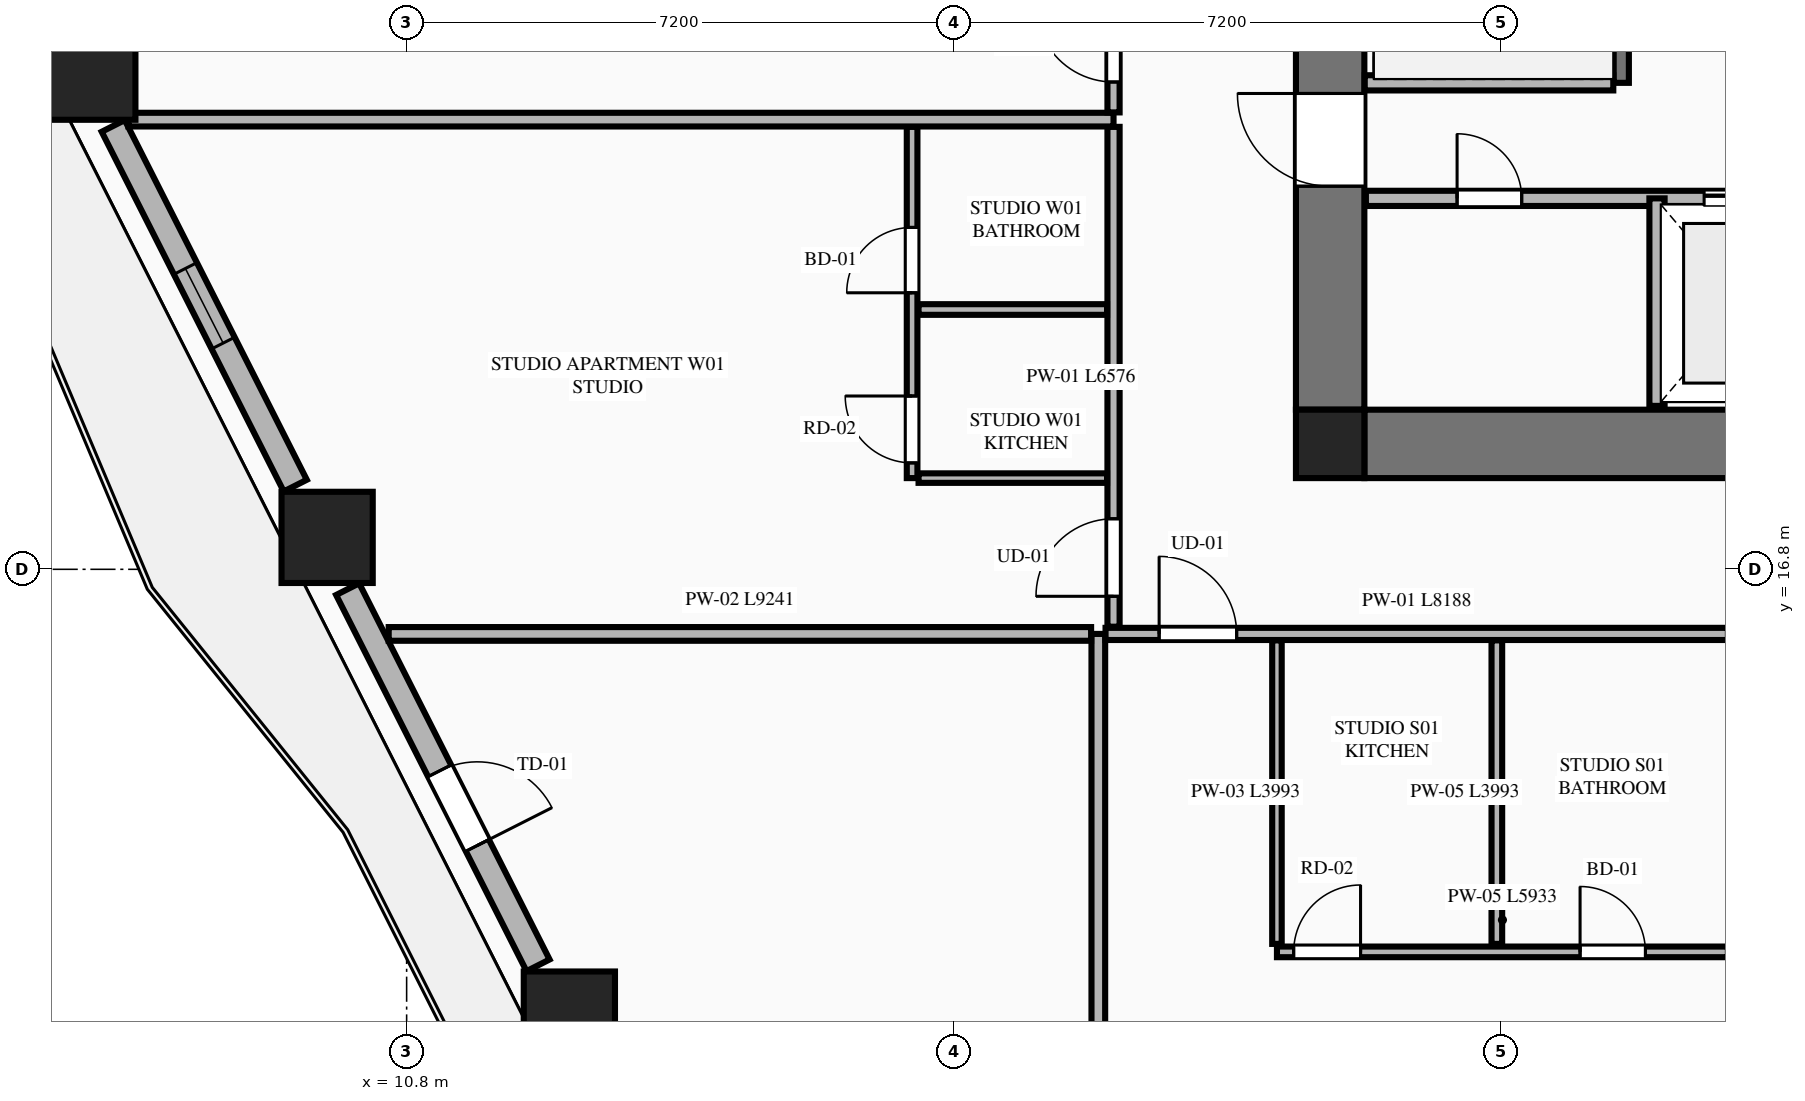
"""IFC4 building model, lengths in metres.
Left out: names, types, materials, properties, quantities, classifications, styles, units other than length and angle.
Written with IfcOpenShell. Run it as: python <this file> out.ifc"""

import sys

from ifc_helpers import new_model, si_unit, direction, frame, frame_2d, origin, origin_2d, place, context, subcontext, project, spatial, rectangle, extrude, element, fill, save


model = new_model("IFC4")
c1 = context("Model", 3, precision=1e-05, world=origin(), true_north=direction((0.0, 1.0)))
c2 = subcontext(c1, "Body", "Model", "MODEL_VIEW")
j1 = project(units=[si_unit("LENGTHUNIT", "METRE"), si_unit("PLANEANGLEUNIT", "RADIAN")], contexts=[c1])
p1 = place(None, origin())
s1 = spatial("IfcSite", under=j1, at=p1, CompositionType="ELEMENT")
p2 = place(p1, origin())
s2 = spatial("IfcBuilding", under=s1, at=p2, CompositionType="ELEMENT")
p3 = place(p2, frame((0.0, 0.0, 39.1)))
s3 = spatial("IfcBuildingStorey", under=s2, at=p3, CompositionType="ELEMENT", Elevation=39.1)
p4 = place(p3, frame((22.95, 18.45, 0.0), z_axis=(0.0, 0.0, 1.0), x_axis=(1.0, 0.0, 0.0)))
e1 = element("IfcColumn", 1, at=p4, inside=s3, PredefinedType="COLUMN", context=c2, shape_type="SweptSolid", body=[
    extrude(rectangle(XDim=0.9, YDim=0.9, at=origin_2d()), origin(), (0.0, 0.0, 1.0), 3.55),
])
p5 = place(p3, frame((23.4, 18.45, 0.0), z_axis=(0.0, 0.0, 1.0), x_axis=(1.0, 0.0, 0.0)))
e2 = element("IfcWall", 2, at=p5, inside=s3, PredefinedType="SHEAR", context=c2, shape_type="SweptSolid", body=[
    extrude(rectangle(XDim=18.0, YDim=0.9, at=frame_2d((9.0, 0.0))), origin(), (0.0, 0.0, 1.0), 3.33),
])
p6 = place(p3, frame((22.95, 18.9, 0.0), z_axis=(0.0, 0.0, 1.0), x_axis=(0.0, 1.0, 0.0)))
e3 = element("IfcWall", 3, at=p6, inside=s3, PredefinedType="SHEAR", context=c2, shape_type="SweptSolid", body=[
    extrude(rectangle(XDim=14.0, YDim=0.9, at=frame_2d((7.0, 0.0))), origin(), (0.0, 0.0, 1.0), 3.33),
])
p7 = place(p6, frame((2.94, 0.0, 0.0)))
e4 = element("IfcOpeningElement", 4, at=p7, cuts=e3, PredefinedType="OPENING", context=c2, shape_type="SweptSolid", body=[
    extrude(rectangle(XDim=1.22, YDim=2.25, at=frame_2d((0.61, 1.125))), frame((0.0, 0.46, 0.0), z_axis=(0.0, -1.0, 0.0), x_axis=(1.0, 0.0, 0.0)), (0.0, 0.0, 1.0), 0.92),
])
for number, where, z_axis, x_axis in (
    (5, (6.632, 23.314, 0.0), (0.0, 0.0, 1.0), (1.0, 0.0, 0.0)),
    (6, (9.754, 17.22, 0.0), (0.0, 0.0, 1.0), (1.0, 0.0, 0.0)),
    (7, (12.941, 10.909, 0.0), (0.0, 0.0, 1.0), (1.0, 0.0, 0.0)),
):
    element("IfcColumn", number, at=place(p3, frame(where, z_axis=z_axis, x_axis=x_axis)), inside=s3, PredefinedType="COLUMN", context=c2, shape_type="SweptSolid", body=[
        extrude(rectangle(XDim=1.2, YDim=1.2, at=origin_2d()), origin(), (0.0, 0.0, 1.0), 3.55),
    ])
p8 = place(p3, frame((26.78, 23.2, 0.0), z_axis=(0.0, 0.0, 1.0), x_axis=(0.0, 1.0, 0.0)))
e8 = element("IfcWall", 8, at=p8, inside=s3, PredefinedType="SHEAR", context=c2, shape_type="SweptSolid", body=[
    extrude(rectangle(XDim=6.78, YDim=0.2, at=frame_2d((3.39, 0.0))), origin(), (0.0, 0.0, 1.0), 3.55),
])
p9 = place(p8, frame((5.32, 0.0, 0.0)))
e9 = element("IfcOpeningElement", 9, at=p9, cuts=e8, PredefinedType="OPENING", context=c2, shape_type="SweptSolid", body=[
    extrude(rectangle(XDim=1.05, YDim=2.15, at=frame_2d((0.525, 1.075))), frame((0.0, 0.11, 0.0), z_axis=(0.0, -1.0, 0.0), x_axis=(1.0, 0.0, 0.0)), (0.0, 0.0, 1.0), 0.22),
])
p10 = place(p3, frame((23.405, 23.2, 0.0), z_axis=(0.0, 0.0, 1.0), x_axis=(1.0, 0.0, 0.0)))
e10 = element("IfcWall", 10, at=p10, inside=s3, PredefinedType="PLUMBINGWALL", context=c2, shape_type="SweptSolid", body=[
    extrude(rectangle(XDim=3.27, YDim=0.2, at=frame_2d((1.635, 0.0))), origin(), (0.0, 0.0, 1.0), 3.33),
])
p11 = place(p3, frame((23.42, 21.68, 0.0), z_axis=(0.0, 0.0, 1.0), x_axis=(1.0, 0.0, 0.0)))
e11 = element("IfcWall", 11, at=p11, inside=s3, PredefinedType="PLUMBINGWALL", context=c2, shape_type="SweptSolid", body=[
    extrude(rectangle(XDim=17.96, YDim=0.2, at=frame_2d((8.98, 0.0))), origin(), (0.0, 0.0, 1.0), 3.33),
])
p12 = place(p11, frame((4.45, 0.0, 0.0)))
e12 = element("IfcOpeningElement", 12, at=p12, cuts=e11, PredefinedType="OPENING", context=c2, shape_type="SweptSolid", body=[
    extrude(rectangle(XDim=1.1, YDim=2.2, at=frame_2d((0.55, 1.1))), frame((0.0, 0.11, 0.0), z_axis=(0.0, -1.0, 0.0), x_axis=(1.0, 0.0, 0.0)), (0.0, 0.0, 1.0), 0.22),
])
p13 = place(p11, frame((6.85, 0.0, 0.0)))
e13 = element("IfcOpeningElement", 13, at=p13, cuts=e11, PredefinedType="OPENING", context=c2, shape_type="SweptSolid", body=[
    extrude(rectangle(XDim=1.1, YDim=2.2, at=frame_2d((0.55, 1.1))), frame((0.0, 0.11, 0.0), z_axis=(0.0, -1.0, 0.0), x_axis=(1.0, 0.0, 0.0)), (0.0, 0.0, 1.0), 0.22),
])
p14 = place(p11, frame((9.25, 0.0, 0.0)))
e14 = element("IfcOpeningElement", 14, at=p14, cuts=e11, PredefinedType="OPENING", context=c2, shape_type="SweptSolid", body=[
    extrude(rectangle(XDim=1.1, YDim=2.2, at=frame_2d((0.55, 1.1))), frame((0.0, 0.11, 0.0), z_axis=(0.0, -1.0, 0.0), x_axis=(1.0, 0.0, 0.0)), (0.0, 0.0, 1.0), 0.22),
])
p15 = place(p11, frame((1.2, 0.0, 0.0)))
e15 = element("IfcOpeningElement", 15, at=p15, cuts=e11, PredefinedType="OPENING", context=c2, shape_type="SweptSolid", body=[
    extrude(rectangle(XDim=0.85, YDim=2.05, at=frame_2d((0.425, 1.025))), frame((0.0, 0.11, 0.0), z_axis=(0.0, -1.0, 0.0), x_axis=(1.0, 0.0, 0.0)), (0.0, 0.0, 1.0), 0.22),
])
p16 = place(p11, frame((13.55, 0.0, 0.0)))
e16 = element("IfcOpeningElement", 16, at=p16, cuts=e11, PredefinedType="OPENING", context=c2, shape_type="SweptSolid", body=[
    extrude(rectangle(XDim=0.85, YDim=2.05, at=frame_2d((0.425, 1.025))), frame((0.0, 0.11, 0.0), z_axis=(0.0, -1.0, 0.0), x_axis=(1.0, 0.0, 0.0)), (0.0, 0.0, 1.0), 0.22),
])
p17 = place(p11, frame((15.85, 0.0, 0.0)))
e17 = element("IfcOpeningElement", 17, at=p17, cuts=e11, PredefinedType="OPENING", context=c2, shape_type="SweptSolid", body=[
    extrude(rectangle(XDim=0.85, YDim=2.05, at=frame_2d((0.425, 1.025))), frame((0.0, 0.11, 0.0), z_axis=(0.0, -1.0, 0.0), x_axis=(1.0, 0.0, 0.0)), (0.0, 0.0, 1.0), 0.22),
])
p18 = place(p3, frame((27.25, 18.95, 0.0), z_axis=(0.0, 0.0, 1.0), x_axis=(0.0, 1.0, 0.0)))
e18 = element("IfcWall", 18, at=p18, inside=s3, PredefinedType="PLUMBINGWALL", context=c2, shape_type="SweptSolid", body=[
    extrude(rectangle(XDim=2.73, YDim=0.2, at=frame_2d((1.365, 0.0))), origin(), (0.0, 0.0, 1.0), 3.33),
])
p19 = place(p3, frame((6.94, 22.633, 0.0), z_axis=(0.0, 0.0, 1.0), x_axis=(0.451572088722, -0.892234637686, 0.0)))
e19 = element("IfcWall", 19, at=p19, inside=s3, PredefinedType="STANDARD", context=c2, shape_type="SweptSolid", body=[
    extrude(rectangle(XDim=5.304, YDim=0.34, at=frame_2d((2.652, 0.0))), origin(), (0.0, 0.0, 1.0), 2.787),
])
p20 = place(p19, frame((2.102, 0.0, 0.75)))
e20 = element("IfcOpeningElement", 20, at=p20, cuts=e19, PredefinedType="OPENING", context=c2, shape_type="SweptSolid", body=[
    extrude(rectangle(XDim=1.1, YDim=1.887, at=frame_2d((0.55, 0.943))), frame((0.0, 0.18, 0.0), z_axis=(0.0, -1.0, 0.0), x_axis=(1.0, 0.0, 0.0)), (0.0, 0.0, 1.0), 0.36),
])
p21 = place(p3, frame((10.024, 16.539, 0.0), z_axis=(0.0, 0.0, 1.0), x_axis=(0.451627137896, -0.892206774417, 0.0)))
e21 = element("IfcWall", 21, at=p21, inside=s3, PredefinedType="STANDARD", context=c2, shape_type="SweptSolid", body=[
    extrude(rectangle(XDim=5.547, YDim=0.34, at=frame_2d((2.773, 0.0))), origin(), (0.0, 0.0, 1.0), 2.787),
])
p22 = place(p21, frame((2.679, 0.0, 0.0)))
e22 = element("IfcOpeningElement", 22, at=p22, cuts=e21, PredefinedType="OPENING", context=c2, shape_type="SweptSolid", body=[
    extrude(rectangle(XDim=1.1, YDim=2.25, at=frame_2d((0.55, 1.125))), frame((0.0, 0.18, 0.0), z_axis=(0.0, -1.0, 0.0), x_axis=(1.0, 0.0, 0.0)), (0.0, 0.0, 1.0), 0.36),
])
p23 = place(p3, frame((19.9, 2.455, 0.0), z_axis=(0.0, 0.0, 1.0), x_axis=(0.0, 1.0, 0.0)))
e23 = element("IfcWall", 23, at=p23, inside=s3, PredefinedType="PARTITIONING", context=c2, shape_type="SweptSolid", body=[
    extrude(rectangle(XDim=13.495, YDim=0.18, at=frame_2d((6.748, 0.0))), origin(), (0.0, 0.0, 1.0), 3.33),
])
p24 = place(p3, frame((19.995, 15.95, 0.0), z_axis=(0.0, 0.0, 1.0), x_axis=(1.0, 0.0, 0.0)))
e24 = element("IfcWall", 24, at=p24, inside=s3, PredefinedType="PARTITIONING", context=c2, shape_type="SweptSolid", body=[
    extrude(rectangle(XDim=8.188, YDim=0.16, at=frame_2d((4.094, 0.0))), origin(), (0.0, 0.0, 1.0), 3.33),
])
p25 = place(p24, frame((0.705, 0.0, 0.0)))
e25 = element("IfcOpeningElement", 25, at=p25, cuts=e24, PredefinedType="OPENING", context=c2, shape_type="SweptSolid", body=[
    extrude(rectangle(XDim=1.02, YDim=2.25, at=frame_2d((0.51, 1.125))), frame((0.0, 0.09, 0.0), z_axis=(0.0, -1.0, 0.0), x_axis=(1.0, 0.0, 0.0)), (0.0, 0.0, 1.0), 0.18),
])
p26 = place(p3, frame((22.25, 11.872, 0.0), z_axis=(0.0, 0.0, 1.0), x_axis=(0.0, 1.0, 0.0)))
e26 = element("IfcWall", 26, at=p26, inside=s3, PredefinedType="PARTITIONING", context=c2, shape_type="SweptSolid", body=[
    extrude(rectangle(XDim=3.993, YDim=0.125, at=frame_2d((1.997, 0.0))), origin(), (0.0, 0.0, 1.0), 2.636),
])
p27 = place(p3, frame((22.25, 11.767, 0.0), z_axis=(0.0, 0.0, 1.0), x_axis=(1.0, 0.0, 0.0)))
e27 = element("IfcWall", 27, at=p27, inside=s3, PredefinedType="PLUMBINGWALL", context=c2, shape_type="SweptSolid", body=[
    extrude(rectangle(XDim=5.933, YDim=0.14, at=frame_2d((2.967, 0.0))), origin(), (0.0, 0.0, 1.0), 3.33),
])
p28 = place(p27, frame((3.988, 0.0, 0.0)))
e28 = element("IfcOpeningElement", 28, at=p28, cuts=e27, PredefinedType="OPENING", context=c2, shape_type="SweptSolid", body=[
    extrude(rectangle(XDim=0.86, YDim=2.1, at=frame_2d((0.43, 1.05))), frame((0.0, 0.08, 0.0), z_axis=(0.0, -1.0, 0.0), x_axis=(1.0, 0.0, 0.0)), (0.0, 0.0, 1.0), 0.16),
])
p29 = place(p27, frame((0.22, 0.0, 0.0)))
e29 = element("IfcOpeningElement", 29, at=p29, cuts=e27, PredefinedType="OPENING", context=c2, shape_type="SweptSolid", body=[
    extrude(rectangle(XDim=0.88, YDim=2.15, at=frame_2d((0.44, 1.075))), frame((0.0, 0.08, 0.0), z_axis=(0.0, -1.0, 0.0), x_axis=(1.0, 0.0, 0.0)), (0.0, 0.0, 1.0), 0.16),
])
p30 = place(p3, frame((25.143, 11.872, 0.0), z_axis=(0.0, 0.0, 1.0), x_axis=(0.0, 1.0, 0.0)))
e30 = element("IfcWall", 30, at=p30, inside=s3, PredefinedType="PLUMBINGWALL", context=c2, shape_type="SweptSolid", body=[
    extrude(rectangle(XDim=3.993, YDim=0.14, at=frame_2d((1.997, 0.0))), origin(), (0.0, 0.0, 1.0), 3.33),
])
p31 = place(p3, frame((10.564, 15.95, 0.0), z_axis=(0.0, 0.0, 1.0), x_axis=(1.0, 0.0, 0.0)))
e31 = element("IfcWall", 31, at=p31, inside=s3, PredefinedType="PARTITIONING", context=c2, shape_type="SweptSolid", body=[
    extrude(rectangle(XDim=9.241, YDim=0.18, at=frame_2d((4.621, 0.0))), origin(), (0.0, 0.0, 1.0), 3.33),
])
p32 = place(p3, frame((20.1, 16.045, 0.0), z_axis=(0.0, 0.0, 1.0), x_axis=(0.0, 1.0, 0.0)))
e32 = element("IfcWall", 32, at=p32, inside=s3, PredefinedType="PARTITIONING", context=c2, shape_type="SweptSolid", body=[
    extrude(rectangle(XDim=6.576, YDim=0.16, at=frame_2d((3.288, 0.0))), origin(), (0.0, 0.0, 1.0), 3.33),
])
p33 = place(p32, frame((0.4, 0.0, 0.0)))
e33 = element("IfcOpeningElement", 33, at=p33, cuts=e32, PredefinedType="OPENING", context=c2, shape_type="SweptSolid", body=[
    extrude(rectangle(XDim=1.02, YDim=2.25, at=frame_2d((0.51, 1.125))), frame((0.0, 0.09, 0.0), z_axis=(0.0, -1.0, 0.0), x_axis=(1.0, 0.0, 0.0)), (0.0, 0.0, 1.0), 0.18),
])
p34 = place(p3, frame((17.535, 18.0, 0.0), z_axis=(0.0, 0.0, 1.0), x_axis=(1.0, 0.0, 0.0)))
e34 = element("IfcWall", 34, at=p34, inside=s3, PredefinedType="PARTITIONING", context=c2, shape_type="SweptSolid", body=[
    extrude(rectangle(XDim=2.48, YDim=0.125, at=frame_2d((1.24, 0.0))), origin(), (0.0, 0.0, 1.0), 2.636),
])
p35 = place(p3, frame((17.45, 18.0, 0.0), z_axis=(0.0, 0.0, 1.0), x_axis=(0.0, 1.0, 0.0)))
e35 = element("IfcWall", 35, at=p35, inside=s3, PredefinedType="PLUMBINGWALL", context=c2, shape_type="SweptSolid", body=[
    extrude(rectangle(XDim=4.621, YDim=0.14, at=frame_2d((2.311, 0.0))), origin(), (0.0, 0.0, 1.0), 3.33),
])
p36 = place(p35, frame((2.438, 0.0, 0.0)))
e36 = element("IfcOpeningElement", 36, at=p36, cuts=e35, PredefinedType="OPENING", context=c2, shape_type="SweptSolid", body=[
    extrude(rectangle(XDim=0.86, YDim=2.1, at=frame_2d((0.43, 1.05))), frame((0.0, 0.08, 0.0), z_axis=(0.0, -1.0, 0.0), x_axis=(1.0, 0.0, 0.0)), (0.0, 0.0, 1.0), 0.16),
])
p37 = place(p35, frame((0.2, 0.0, 0.0)))
e37 = element("IfcOpeningElement", 37, at=p37, cuts=e35, PredefinedType="OPENING", context=c2, shape_type="SweptSolid", body=[
    extrude(rectangle(XDim=0.88, YDim=2.15, at=frame_2d((0.44, 1.075))), frame((0.0, 0.08, 0.0), z_axis=(0.0, -1.0, 0.0), x_axis=(1.0, 0.0, 0.0)), (0.0, 0.0, 1.0), 0.16),
])
p38 = place(p3, frame((17.535, 20.218, 0.0), z_axis=(0.0, 0.0, 1.0), x_axis=(1.0, 0.0, 0.0)))
e38 = element("IfcWall", 38, at=p38, inside=s3, PredefinedType="PLUMBINGWALL", context=c2, shape_type="SweptSolid", body=[
    extrude(rectangle(XDim=2.48, YDim=0.14, at=frame_2d((1.24, 0.0))), origin(), (0.0, 0.0, 1.0), 3.33),
])
p39 = place(p3, frame((7.14, 22.716, 0.0), z_axis=(0.0, 0.0, 1.0), x_axis=(1.0, 0.0, 0.0)))
e39 = element("IfcWall", 39, at=p39, inside=s3, PredefinedType="PARTITIONING", context=c2, shape_type="SweptSolid", body=[
    extrude(rectangle(XDim=12.96, YDim=0.18, at=frame_2d((6.48, 0.0))), origin(), (0.0, 0.0, 1.0), 3.33),
])
p40 = place(p3, frame((20.1, 22.811, 0.0), z_axis=(0.0, 0.0, 1.0), x_axis=(0.0, 1.0, 0.0)))
e40 = element("IfcWall", 40, at=p40, inside=s3, PredefinedType="PARTITIONING", context=c2, shape_type="SweptSolid", body=[
    extrude(rectangle(XDim=6.576, YDim=0.16, at=frame_2d((3.288, 0.0))), origin(), (0.0, 0.0, 1.0), 3.33),
])
p41 = place(p40, frame((0.4, 0.0, 0.0)))
e41 = element("IfcOpeningElement", 41, at=p41, cuts=e40, PredefinedType="OPENING", context=c2, shape_type="SweptSolid", body=[
    extrude(rectangle(XDim=1.02, YDim=2.25, at=frame_2d((0.51, 1.125))), frame((0.0, 0.09, 0.0), z_axis=(0.0, -1.0, 0.0), x_axis=(1.0, 0.0, 0.0)), (0.0, 0.0, 1.0), 0.18),
])
p42 = place(p7, origin())
e42 = element("IfcDoor", 42, at=p42, inside=s3, OperationType="SINGLE_SWING_RIGHT", PredefinedType="DOOR", context=c2, shape_type="SweptSolid", body=[
    extrude(rectangle(XDim=1.22, YDim=2.25, at=frame_2d((0.61, 1.125))), frame((0.0, 0.025, 0.0), z_axis=(0.0, -1.0, 0.0), x_axis=(1.0, 0.0, 0.0)), (0.0, 0.0, 1.0), 0.05),
])
fill(e4, e42)
p43 = place(p12, origin())
e43 = element("IfcDoor", 43, at=p43, inside=s3, OperationType="DOUBLE_DOOR_SLIDING", PredefinedType="DOOR", context=c2, shape_type="SweptSolid", body=[
    extrude(rectangle(XDim=1.1, YDim=2.2, at=frame_2d((0.55, 1.1))), frame((0.0, 0.025, 0.0), z_axis=(0.0, -1.0, 0.0), x_axis=(1.0, 0.0, 0.0)), (0.0, 0.0, 1.0), 0.05),
])
fill(e12, e43)
p44 = place(p15, origin())
e44 = element("IfcDoor", 44, at=p44, inside=s3, OperationType="SINGLE_SWING_LEFT", PredefinedType="DOOR", context=c2, shape_type="SweptSolid", body=[
    extrude(rectangle(XDim=0.85, YDim=2.05, at=frame_2d((0.425, 1.025))), frame((0.0, 0.025, 0.0), z_axis=(0.0, -1.0, 0.0), x_axis=(1.0, 0.0, 0.0)), (0.0, 0.0, 1.0), 0.05),
])
fill(e15, e44)
p45 = place(p20, origin())
e45 = element("IfcWindow", 45, at=p45, inside=s3, PartitioningType="SINGLE_PANEL", PredefinedType="WINDOW", context=c2, shape_type="SweptSolid", body=[
    extrude(rectangle(XDim=1.1, YDim=1.887, at=frame_2d((0.55, 0.943))), frame((0.0, 0.03, 0.0), z_axis=(0.0, -1.0, 0.0), x_axis=(1.0, 0.0, 0.0)), (0.0, 0.0, 1.0), 0.06),
])
fill(e20, e45)
p46 = place(p22, origin())
e46 = element("IfcDoor", 46, at=p46, inside=s3, OperationType="SINGLE_SWING_RIGHT", PredefinedType="DOOR", context=c2, shape_type="SweptSolid", body=[
    extrude(rectangle(XDim=1.1, YDim=2.25, at=frame_2d((0.55, 1.125))), frame((0.0, 0.025, 0.0), z_axis=(0.0, -1.0, 0.0), x_axis=(1.0, 0.0, 0.0)), (0.0, 0.0, 1.0), 0.05),
])
fill(e22, e46)
p47 = place(p28, origin())
e47 = element("IfcDoor", 47, at=p47, inside=s3, OperationType="SINGLE_SWING_LEFT", PredefinedType="DOOR", context=c2, shape_type="SweptSolid", body=[
    extrude(rectangle(XDim=0.86, YDim=2.1, at=frame_2d((0.43, 1.05))), frame((0.0, 0.025, 0.0), z_axis=(0.0, -1.0, 0.0), x_axis=(1.0, 0.0, 0.0)), (0.0, 0.0, 1.0), 0.05),
])
fill(e28, e47)
p48 = place(p25, origin())
e48 = element("IfcDoor", 48, at=p48, inside=s3, OperationType="SINGLE_SWING_LEFT", PredefinedType="DOOR", context=c2, shape_type="SweptSolid", body=[
    extrude(rectangle(XDim=1.02, YDim=2.25, at=frame_2d((0.51, 1.125))), frame((0.0, 0.025, 0.0), z_axis=(0.0, -1.0, 0.0), x_axis=(1.0, 0.0, 0.0)), (0.0, 0.0, 1.0), 0.05),
])
fill(e25, e48)
p49 = place(p29, origin())
e49 = element("IfcDoor", 49, at=p49, inside=s3, OperationType="SINGLE_SWING_RIGHT", PredefinedType="DOOR", context=c2, shape_type="SweptSolid", body=[
    extrude(rectangle(XDim=0.88, YDim=2.15, at=frame_2d((0.44, 1.075))), frame((0.0, 0.025, 0.0), z_axis=(0.0, -1.0, 0.0), x_axis=(1.0, 0.0, 0.0)), (0.0, 0.0, 1.0), 0.05),
])
fill(e29, e49)
p50 = place(p36, origin())
e50 = element("IfcDoor", 50, at=p50, inside=s3, OperationType="SINGLE_SWING_LEFT", PredefinedType="DOOR", context=c2, shape_type="SweptSolid", body=[
    extrude(rectangle(XDim=0.86, YDim=2.1, at=frame_2d((0.43, 1.05))), frame((0.0, 0.025, 0.0), z_axis=(0.0, -1.0, 0.0), x_axis=(1.0, 0.0, 0.0)), (0.0, 0.0, 1.0), 0.05),
])
fill(e36, e50)
p51 = place(p33, origin())
e51 = element("IfcDoor", 51, at=p51, inside=s3, OperationType="SINGLE_SWING_LEFT", PredefinedType="DOOR", context=c2, shape_type="SweptSolid", body=[
    extrude(rectangle(XDim=1.02, YDim=2.25, at=frame_2d((0.51, 1.125))), frame((0.0, 0.025, 0.0), z_axis=(0.0, -1.0, 0.0), x_axis=(1.0, 0.0, 0.0)), (0.0, 0.0, 1.0), 0.05),
])
fill(e33, e51)
p52 = place(p37, origin())
e52 = element("IfcDoor", 52, at=p52, inside=s3, OperationType="SINGLE_SWING_RIGHT", PredefinedType="DOOR", context=c2, shape_type="SweptSolid", body=[
    extrude(rectangle(XDim=0.88, YDim=2.15, at=frame_2d((0.44, 1.075))), frame((0.0, 0.025, 0.0), z_axis=(0.0, -1.0, 0.0), x_axis=(1.0, 0.0, 0.0)), (0.0, 0.0, 1.0), 0.05),
])
fill(e37, e52)
p53 = place(p41, origin())
e53 = element("IfcDoor", 53, at=p53, inside=s3, OperationType="SINGLE_SWING_RIGHT", PredefinedType="DOOR", context=c2, shape_type="SweptSolid", body=[
    extrude(rectangle(XDim=1.02, YDim=2.25, at=frame_2d((0.51, 1.125))), frame((0.0, 0.025, 0.0), z_axis=(0.0, -1.0, 0.0), x_axis=(1.0, 0.0, 0.0)), (0.0, 0.0, 1.0), 0.05),
])
fill(e41, e53)
save(model, sys.argv[1])
